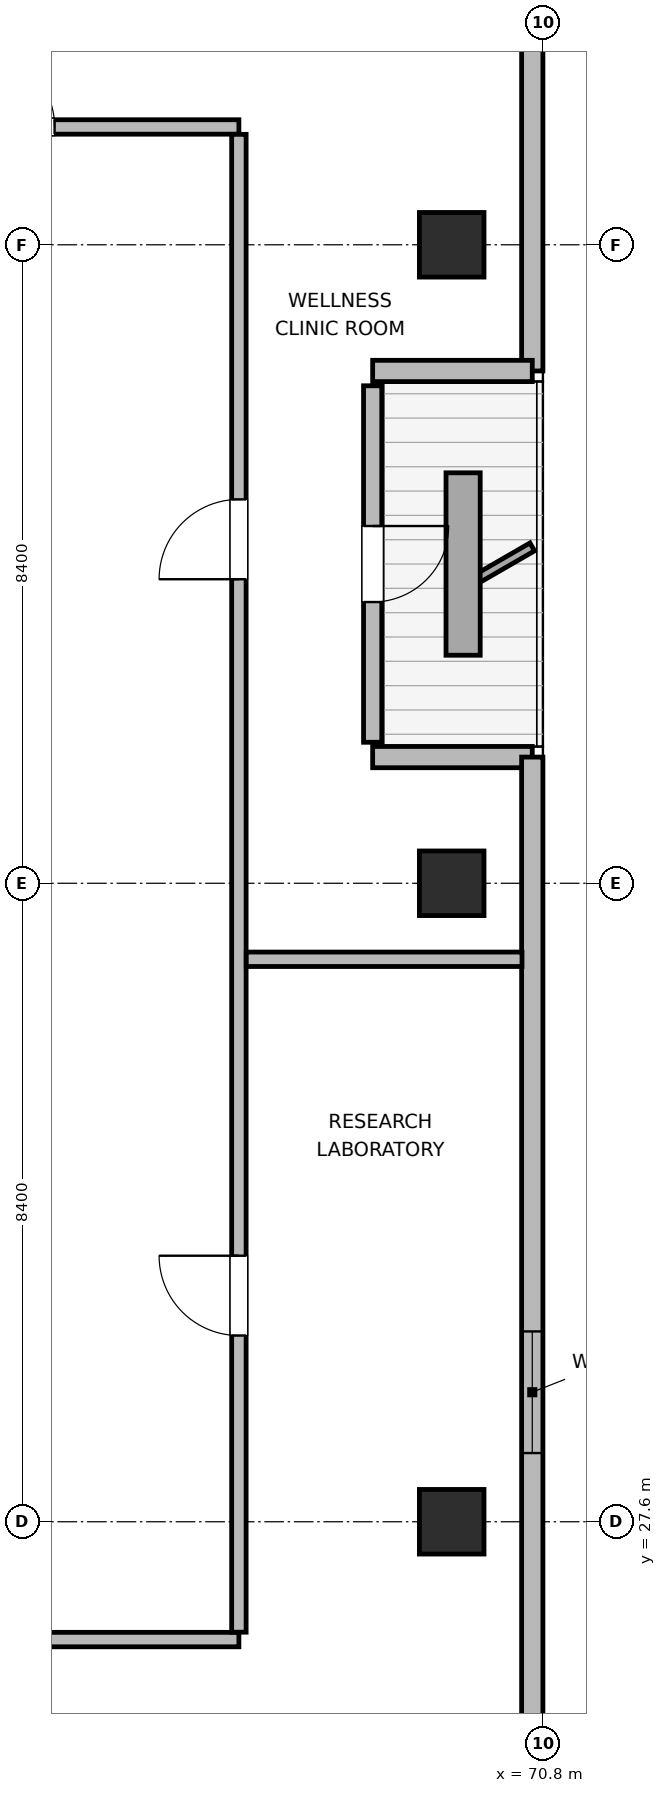
"""IFC4 building model, lengths in metres.
Left out: names, types, materials, properties, quantities, classifications, styles, units other than length and angle.
Written with IfcOpenShell. Run it as: python <this file> out.ifc"""

import sys

from ifc_helpers import new_model, si_unit, direction, frame, frame_2d, origin, origin_2d, place, context, subcontext, project, spatial, rectangle, extrude, element, fill, save


model = new_model("IFC4")
c1 = context("Model", 3, precision=1e-05, world=origin(), true_north=direction((0.0, 1.0)))
c2 = subcontext(c1, "Body", "Model", "MODEL_VIEW")
j1 = project(units=[si_unit("LENGTHUNIT", "METRE"), si_unit("PLANEANGLEUNIT", "RADIAN")], contexts=[c1])
p1 = place(None, origin())
s1 = spatial("IfcSite", under=j1, at=p1, CompositionType="ELEMENT")
p2 = place(p1, origin())
s2 = spatial("IfcBuilding", under=s1, at=p2, CompositionType="ELEMENT")
p3 = place(p2, frame((0.0, 0.0, 346.5)))
s3 = spatial("IfcBuildingStorey", under=s2, at=p3, CompositionType="ELEMENT", Elevation=346.5)
for number, where, z_axis, x_axis in (
    (1, (69.6, 27.6, 0.0), (0.0, 0.0, 1.0), (1.0, 0.0, 0.0)),
    (2, (69.6, 36.0, 0.0), (0.0, 0.0, 1.0), (1.0, 0.0, 0.0)),
    (3, (69.6, 44.4, 0.0), (0.0, 0.0, 1.0), (1.0, 0.0, 0.0)),
):
    element("IfcColumn", number, at=place(p3, frame(where, z_axis=z_axis, x_axis=x_axis)), inside=s3, PredefinedType="COLUMN", context=c2, shape_type="SweptSolid", body=[
        extrude(rectangle(XDim=0.85, YDim=0.85, at=origin_2d()), origin(), (0.0, 0.0, 1.0), 3.9),
    ])
p4 = place(p3, frame((70.66, 48.582, 0.0), z_axis=(0.0, 0.0, 1.0), x_axis=(0.0, -1.0, 0.0)))
e4 = element("IfcWall", 4, at=p4, inside=s3, PredefinedType="SOLIDWALL", context=c2, shape_type="SweptSolid", body=[
    extrude(rectangle(XDim=5.842, YDim=0.28, at=frame_2d((2.921, 0.0))), origin(), (0.0, 0.0, 1.0), 3.68),
])
p5 = place(p3, frame((70.66, 42.74, 0.0), z_axis=(0.0, 0.0, 1.0), x_axis=(-1.0, 0.0, 0.0)))
e5 = element("IfcWall", 5, at=p5, inside=s3, PredefinedType="SOLIDWALL", context=c2, shape_type="SweptSolid", body=[
    extrude(rectangle(XDim=2.1, YDim=0.28, at=frame_2d((1.05, 0.0))), origin(), (0.0, 0.0, 1.0), 2.215),
])
p6 = place(p3, frame((68.56, 42.545, 0.0), z_axis=(0.0, 0.0, 1.0), x_axis=(0.0, -1.0, 0.0)))
e6 = element("IfcWall", 6, at=p6, inside=s3, PredefinedType="SOLIDWALL", context=c2, shape_type="SweptSolid", body=[
    extrude(rectangle(XDim=4.69, YDim=0.24, at=frame_2d((2.345, 0.0))), origin(), (0.0, 0.0, 1.0), 3.311),
])
p7 = place(p6, frame((1.845, 0.0, 0.0)))
e7 = element("IfcOpeningElement", 7, at=p7, cuts=e6, PredefinedType="OPENING", context=c2, shape_type="SweptSolid", body=[
    extrude(rectangle(XDim=1.0, YDim=2.02, at=frame_2d((0.5, 1.01))), frame((0.0, 0.13, 0.0), z_axis=(0.0, -1.0, 0.0), x_axis=(1.0, 0.0, 0.0)), (0.0, 0.0, 1.0), 0.26),
])
p8 = place(p3, frame((68.56, 37.66, 0.0), z_axis=(0.0, 0.0, 1.0), x_axis=(1.0, 0.0, 0.0)))
e8 = element("IfcWall", 8, at=p8, inside=s3, PredefinedType="SOLIDWALL", context=c2, shape_type="SweptSolid", body=[
    extrude(rectangle(XDim=2.1, YDim=0.28, at=frame_2d((1.05, 0.0))), origin(), (0.0, 0.0, 1.0), 2.215),
])
p9 = place(p3, frame((70.66, 37.66, 0.0), z_axis=(0.0, 0.0, 1.0), x_axis=(0.0, -1.0, 0.0)))
e9 = element("IfcWall", 9, at=p9, inside=s3, PredefinedType="SOLIDWALL", context=c2, shape_type="SweptSolid", body=[
    extrude(rectangle(XDim=14.241, YDim=0.28, at=frame_2d((7.121, 0.0))), origin(), (0.0, 0.0, 1.0), 3.68),
])
p10 = place(p9, frame((7.556, 0.0, 0.85)))
e10 = element("IfcOpeningElement", 10, at=p10, cuts=e9, PredefinedType="OPENING", context=c2, shape_type="SweptSolid", body=[
    extrude(rectangle(XDim=1.6, YDim=1.0, at=frame_2d((0.8, 0.5))), frame((0.0, 0.15, 0.0), z_axis=(0.0, -1.0, 0.0), x_axis=(1.0, 0.0, 0.0)), (0.0, 0.0, 1.0), 0.3),
])
p11 = place(p3, frame((29.4, 26.05, 0.0), z_axis=(0.0, 0.0, 1.0), x_axis=(1.0, 0.0, 0.0)))
e11 = element("IfcWall", 11, at=p11, inside=s3, PredefinedType="PLUMBINGWALL", context=c2, shape_type="SweptSolid", body=[
    extrude(rectangle(XDim=37.4, YDim=0.19, at=frame_2d((18.7, 0.0))), origin(), (0.0, 0.0, 1.0), 3.68),
])
p12 = place(p11, frame((1.025, 0.0, 0.0)))
e12 = element("IfcOpeningElement", 12, at=p12, cuts=e11, PredefinedType="OPENING", context=c2, shape_type="SweptSolid", body=[
    extrude(rectangle(XDim=1.05, YDim=2.04, at=frame_2d((0.525, 1.02))), frame((0.0, 0.105, 0.0), z_axis=(0.0, -1.0, 0.0), x_axis=(1.0, 0.0, 0.0)), (0.0, 0.0, 1.0), 0.21),
])
p13 = place(p11, frame((4.125, 0.0, 0.0)))
e13 = element("IfcOpeningElement", 13, at=p13, cuts=e11, PredefinedType="OPENING", context=c2, shape_type="SweptSolid", body=[
    extrude(rectangle(XDim=1.05, YDim=2.04, at=frame_2d((0.525, 1.02))), frame((0.0, 0.105, 0.0), z_axis=(0.0, -1.0, 0.0), x_axis=(1.0, 0.0, 0.0)), (0.0, 0.0, 1.0), 0.21),
])
p14 = place(p11, frame((7.325, 0.0, 0.0)))
e14 = element("IfcOpeningElement", 14, at=p14, cuts=e11, PredefinedType="OPENING", context=c2, shape_type="SweptSolid", body=[
    extrude(rectangle(XDim=1.05, YDim=2.04, at=frame_2d((0.525, 1.02))), frame((0.0, 0.105, 0.0), z_axis=(0.0, -1.0, 0.0), x_axis=(1.0, 0.0, 0.0)), (0.0, 0.0, 1.0), 0.21),
])
p15 = place(p11, frame((10.525, 0.0, 0.0)))
e15 = element("IfcOpeningElement", 15, at=p15, cuts=e11, PredefinedType="OPENING", context=c2, shape_type="SweptSolid", body=[
    extrude(rectangle(XDim=1.05, YDim=2.04, at=frame_2d((0.525, 1.02))), frame((0.0, 0.105, 0.0), z_axis=(0.0, -1.0, 0.0), x_axis=(1.0, 0.0, 0.0)), (0.0, 0.0, 1.0), 0.21),
])
p16 = place(p11, frame((14.525, 0.0, 0.0)))
e16 = element("IfcOpeningElement", 16, at=p16, cuts=e11, PredefinedType="OPENING", context=c2, shape_type="SweptSolid", body=[
    extrude(rectangle(XDim=1.05, YDim=2.04, at=frame_2d((0.525, 1.02))), frame((0.0, 0.105, 0.0), z_axis=(0.0, -1.0, 0.0), x_axis=(1.0, 0.0, 0.0)), (0.0, 0.0, 1.0), 0.21),
])
p17 = place(p11, frame((18.625, 0.0, 0.0)))
e17 = element("IfcOpeningElement", 17, at=p17, cuts=e11, PredefinedType="OPENING", context=c2, shape_type="SweptSolid", body=[
    extrude(rectangle(XDim=1.05, YDim=2.04, at=frame_2d((0.525, 1.02))), frame((0.0, 0.105, 0.0), z_axis=(0.0, -1.0, 0.0), x_axis=(1.0, 0.0, 0.0)), (0.0, 0.0, 1.0), 0.21),
])
p18 = place(p11, frame((22.025, 0.0, 0.0)))
e18 = element("IfcOpeningElement", 18, at=p18, cuts=e11, PredefinedType="OPENING", context=c2, shape_type="SweptSolid", body=[
    extrude(rectangle(XDim=1.05, YDim=2.04, at=frame_2d((0.525, 1.02))), frame((0.0, 0.105, 0.0), z_axis=(0.0, -1.0, 0.0), x_axis=(1.0, 0.0, 0.0)), (0.0, 0.0, 1.0), 0.21),
])
p19 = place(p11, frame((25.425, 0.0, 0.0)))
e19 = element("IfcOpeningElement", 19, at=p19, cuts=e11, PredefinedType="OPENING", context=c2, shape_type="SweptSolid", body=[
    extrude(rectangle(XDim=1.05, YDim=2.04, at=frame_2d((0.525, 1.02))), frame((0.0, 0.105, 0.0), z_axis=(0.0, -1.0, 0.0), x_axis=(1.0, 0.0, 0.0)), (0.0, 0.0, 1.0), 0.21),
])
p20 = place(p11, frame((28.825, 0.0, 0.0)))
e20 = element("IfcOpeningElement", 20, at=p20, cuts=e11, PredefinedType="OPENING", context=c2, shape_type="SweptSolid", body=[
    extrude(rectangle(XDim=1.05, YDim=2.04, at=frame_2d((0.525, 1.02))), frame((0.0, 0.105, 0.0), z_axis=(0.0, -1.0, 0.0), x_axis=(1.0, 0.0, 0.0)), (0.0, 0.0, 1.0), 0.21),
])
p21 = place(p11, frame((33.725, 0.0, 0.0)))
e21 = element("IfcOpeningElement", 21, at=p21, cuts=e11, PredefinedType="OPENING", context=c2, shape_type="SweptSolid", body=[
    extrude(rectangle(XDim=1.05, YDim=2.04, at=frame_2d((0.525, 1.02))), frame((0.0, 0.105, 0.0), z_axis=(0.0, -1.0, 0.0), x_axis=(1.0, 0.0, 0.0)), (0.0, 0.0, 1.0), 0.21),
])
p22 = place(p3, frame((29.4, 45.95, 0.0), z_axis=(0.0, 0.0, 1.0), x_axis=(1.0, 0.0, 0.0)))
e22 = element("IfcWall", 22, at=p22, inside=s3, PredefinedType="PLUMBINGWALL", context=c2, shape_type="SweptSolid", body=[
    extrude(rectangle(XDim=37.4, YDim=0.19, at=frame_2d((18.7, 0.0))), origin(), (0.0, 0.0, 1.0), 3.68),
])
p23 = place(p22, frame((1.025, 0.0, 0.0)))
e23 = element("IfcOpeningElement", 23, at=p23, cuts=e22, PredefinedType="OPENING", context=c2, shape_type="SweptSolid", body=[
    extrude(rectangle(XDim=1.05, YDim=2.04, at=frame_2d((0.525, 1.02))), frame((0.0, 0.105, 0.0), z_axis=(0.0, -1.0, 0.0), x_axis=(1.0, 0.0, 0.0)), (0.0, 0.0, 1.0), 0.21),
])
p24 = place(p22, frame((4.125, 0.0, 0.0)))
e24 = element("IfcOpeningElement", 24, at=p24, cuts=e22, PredefinedType="OPENING", context=c2, shape_type="SweptSolid", body=[
    extrude(rectangle(XDim=1.05, YDim=2.04, at=frame_2d((0.525, 1.02))), frame((0.0, 0.105, 0.0), z_axis=(0.0, -1.0, 0.0), x_axis=(1.0, 0.0, 0.0)), (0.0, 0.0, 1.0), 0.21),
])
p25 = place(p22, frame((7.325, 0.0, 0.0)))
e25 = element("IfcOpeningElement", 25, at=p25, cuts=e22, PredefinedType="OPENING", context=c2, shape_type="SweptSolid", body=[
    extrude(rectangle(XDim=1.05, YDim=2.04, at=frame_2d((0.525, 1.02))), frame((0.0, 0.105, 0.0), z_axis=(0.0, -1.0, 0.0), x_axis=(1.0, 0.0, 0.0)), (0.0, 0.0, 1.0), 0.21),
])
p26 = place(p22, frame((10.525, 0.0, 0.0)))
e26 = element("IfcOpeningElement", 26, at=p26, cuts=e22, PredefinedType="OPENING", context=c2, shape_type="SweptSolid", body=[
    extrude(rectangle(XDim=1.05, YDim=2.04, at=frame_2d((0.525, 1.02))), frame((0.0, 0.105, 0.0), z_axis=(0.0, -1.0, 0.0), x_axis=(1.0, 0.0, 0.0)), (0.0, 0.0, 1.0), 0.21),
])
p27 = place(p22, frame((13.925, 0.0, 0.0)))
e27 = element("IfcOpeningElement", 27, at=p27, cuts=e22, PredefinedType="OPENING", context=c2, shape_type="SweptSolid", body=[
    extrude(rectangle(XDim=1.05, YDim=2.04, at=frame_2d((0.525, 1.02))), frame((0.0, 0.105, 0.0), z_axis=(0.0, -1.0, 0.0), x_axis=(1.0, 0.0, 0.0)), (0.0, 0.0, 1.0), 0.21),
])
p28 = place(p22, frame((20.125, 0.0, 0.0)))
e28 = element("IfcOpeningElement", 28, at=p28, cuts=e22, PredefinedType="OPENING", context=c2, shape_type="SweptSolid", body=[
    extrude(rectangle(XDim=1.05, YDim=2.04, at=frame_2d((0.525, 1.02))), frame((0.0, 0.105, 0.0), z_axis=(0.0, -1.0, 0.0), x_axis=(1.0, 0.0, 0.0)), (0.0, 0.0, 1.0), 0.21),
])
p29 = place(p22, frame((26.125, 0.0, 0.0)))
e29 = element("IfcOpeningElement", 29, at=p29, cuts=e22, PredefinedType="OPENING", context=c2, shape_type="SweptSolid", body=[
    extrude(rectangle(XDim=1.05, YDim=2.04, at=frame_2d((0.525, 1.02))), frame((0.0, 0.105, 0.0), z_axis=(0.0, -1.0, 0.0), x_axis=(1.0, 0.0, 0.0)), (0.0, 0.0, 1.0), 0.21),
])
p30 = place(p22, frame((29.325, 0.0, 0.0)))
e30 = element("IfcOpeningElement", 30, at=p30, cuts=e22, PredefinedType="OPENING", context=c2, shape_type="SweptSolid", body=[
    extrude(rectangle(XDim=1.05, YDim=2.04, at=frame_2d((0.525, 1.02))), frame((0.0, 0.105, 0.0), z_axis=(0.0, -1.0, 0.0), x_axis=(1.0, 0.0, 0.0)), (0.0, 0.0, 1.0), 0.21),
])
p31 = place(p22, frame((33.925, 0.0, 0.0)))
e31 = element("IfcOpeningElement", 31, at=p31, cuts=e22, PredefinedType="OPENING", context=c2, shape_type="SweptSolid", body=[
    extrude(rectangle(XDim=1.05, YDim=2.04, at=frame_2d((0.525, 1.02))), frame((0.0, 0.105, 0.0), z_axis=(0.0, -1.0, 0.0), x_axis=(1.0, 0.0, 0.0)), (0.0, 0.0, 1.0), 0.21),
])
p32 = place(p3, frame((66.8, 26.147, 0.0), z_axis=(0.0, 0.0, 1.0), x_axis=(0.0, 1.0, 0.0)))
e32 = element("IfcWall", 32, at=p32, inside=s3, PredefinedType="PLUMBINGWALL", context=c2, shape_type="SweptSolid", body=[
    extrude(rectangle(XDim=19.706, YDim=0.19, at=frame_2d((9.853, 0.0))), origin(), (0.0, 0.0, 1.0), 3.68),
])
p33 = place(p32, frame((3.903, 0.0, 0.0)))
e33 = element("IfcOpeningElement", 33, at=p33, cuts=e32, PredefinedType="OPENING", context=c2, shape_type="SweptSolid", body=[
    extrude(rectangle(XDim=1.05, YDim=2.04, at=frame_2d((0.525, 1.02))), frame((0.0, 0.105, 0.0), z_axis=(0.0, -1.0, 0.0), x_axis=(1.0, 0.0, 0.0)), (0.0, 0.0, 1.0), 0.21),
])
p34 = place(p32, frame((13.853, 0.0, 0.0)))
e34 = element("IfcOpeningElement", 34, at=p34, cuts=e32, PredefinedType="OPENING", context=c2, shape_type="SweptSolid", body=[
    extrude(rectangle(XDim=1.05, YDim=2.04, at=frame_2d((0.525, 1.02))), frame((0.0, 0.105, 0.0), z_axis=(0.0, -1.0, 0.0), x_axis=(1.0, 0.0, 0.0)), (0.0, 0.0, 1.0), 0.21),
])
p35 = place(p3, frame((66.897, 35.0, 0.0), z_axis=(0.0, 0.0, 1.0), x_axis=(1.0, 0.0, 0.0)))
e35 = element("IfcWall", 35, at=p35, inside=s3, PredefinedType="PLUMBINGWALL", context=c2, shape_type="SweptSolid", body=[
    extrude(rectangle(XDim=3.628, YDim=0.19, at=frame_2d((1.814, 0.0))), origin(), (0.0, 0.0, 1.0), 2.215),
])
p36 = place(p7, origin())
e36 = element("IfcDoor", 36, at=p36, inside=s3, OperationType="SINGLE_SWING_LEFT", PredefinedType="DOOR", context=c2, shape_type="SweptSolid", body=[
    extrude(rectangle(XDim=1.0, YDim=2.02, at=frame_2d((0.5, 1.01))), frame((0.0, 0.025, 0.0), z_axis=(0.0, -1.0, 0.0), x_axis=(1.0, 0.0, 0.0)), (0.0, 0.0, 1.0), 0.05),
])
fill(e7, e36)
p37 = place(p10, origin())
e37 = element("IfcWindow", 37, at=p37, inside=s3, PartitioningType="SINGLE_PANEL", PredefinedType="WINDOW", context=c2, shape_type="SweptSolid", body=[
    extrude(rectangle(XDim=1.6, YDim=1.0, at=frame_2d((0.8, 0.5))), frame((0.0, 0.03, 0.0), z_axis=(0.0, -1.0, 0.0), x_axis=(1.0, 0.0, 0.0)), (0.0, 0.0, 1.0), 0.06),
])
fill(e10, e37)
p38 = place(p31, origin())
e38 = element("IfcDoor", 38, at=p38, inside=s3, OperationType="SINGLE_SWING_LEFT", PredefinedType="DOOR", context=c2, shape_type="SweptSolid", body=[
    extrude(rectangle(XDim=1.05, YDim=2.04, at=frame_2d((0.525, 1.02))), frame((0.0, 0.025, 0.0), z_axis=(0.0, -1.0, 0.0), x_axis=(1.0, 0.0, 0.0)), (0.0, 0.0, 1.0), 0.05),
])
fill(e31, e38)
p39 = place(p33, origin())
e39 = element("IfcDoor", 39, at=p39, inside=s3, OperationType="SINGLE_SWING_RIGHT", PredefinedType="DOOR", context=c2, shape_type="SweptSolid", body=[
    extrude(rectangle(XDim=1.05, YDim=2.04, at=frame_2d((0.525, 1.02))), frame((0.0, 0.025, 0.0), z_axis=(0.0, -1.0, 0.0), x_axis=(1.0, 0.0, 0.0)), (0.0, 0.0, 1.0), 0.05),
])
fill(e33, e39)
p40 = place(p34, origin())
e40 = element("IfcDoor", 40, at=p40, inside=s3, OperationType="SINGLE_SWING_LEFT", PredefinedType="DOOR", context=c2, shape_type="SweptSolid", body=[
    extrude(rectangle(XDim=1.05, YDim=2.04, at=frame_2d((0.525, 1.02))), frame((0.0, 0.025, 0.0), z_axis=(0.0, -1.0, 0.0), x_axis=(1.0, 0.0, 0.0)), (0.0, 0.0, 1.0), 0.05),
])
fill(e34, e40)
save(model, sys.argv[1])
